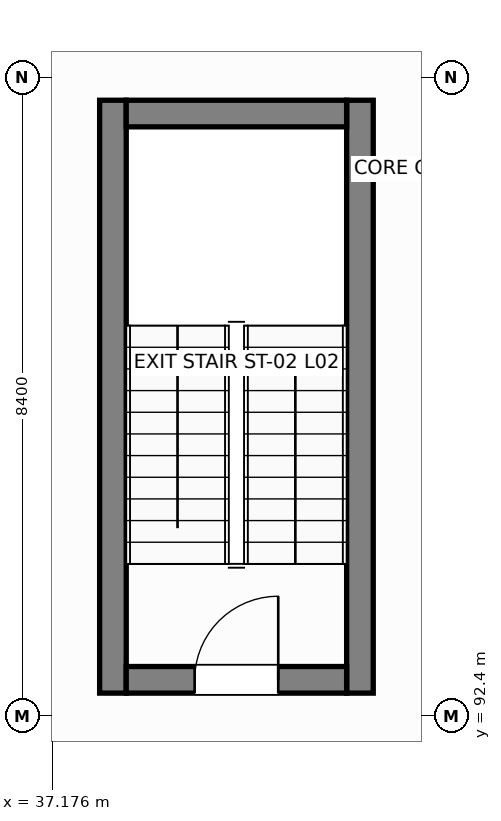
"""IFC4 building model, lengths in metres.
Left out: names, types, materials, properties, quantities, classifications, styles, units other than length and angle.
Written with IfcOpenShell. Run it as: python <this file> out.ifc"""

import sys

from ifc_helpers import new_model, si_unit, direction, frame, frame_2d, origin, place, context, subcontext, project, spatial, rectangle, extrude, element, fill, save


model = new_model("IFC4")
c1 = context("Model", 3, precision=1e-05, world=origin(), true_north=direction((0.0, 1.0)))
c2 = subcontext(c1, "Body", "Model", "MODEL_VIEW")
j1 = project(units=[si_unit("LENGTHUNIT", "METRE"), si_unit("PLANEANGLEUNIT", "RADIAN")], contexts=[c1])
p1 = place(None, origin())
s1 = spatial("IfcSite", under=j1, at=p1, CompositionType="ELEMENT")
p2 = place(p1, origin())
s2 = spatial("IfcBuilding", under=s1, at=p2, CompositionType="ELEMENT")
p3 = place(p2, frame((0.0, 0.0, 9.0)))
s3 = spatial("IfcBuildingStorey", under=s2, at=p3, CompositionType="ELEMENT", Elevation=9.0)
for number, where, z_axis, x_axis in (
    (1, (37.975, 92.7, 0.0), (0.0, 0.0, 1.0), (0.0, 1.0, 0.0)),
    (2, (41.225, 92.7, 0.0), (0.0, 0.0, 1.0), (0.0, 1.0, 0.0)),
):
    element("IfcWall", number, at=place(p3, frame(where, z_axis=z_axis, x_axis=x_axis)), inside=s3, PredefinedType="SHEAR", context=c2, shape_type="SweptSolid", body=[
        extrude(rectangle(XDim=7.8, YDim=0.35, at=frame_2d((3.9, 0.0))), origin(), (0.0, 0.0, 1.0), 3.99),
    ])
p4 = place(p3, frame((38.15, 100.325, 0.0), z_axis=(0.0, 0.0, 1.0), x_axis=(1.0, 0.0, 0.0)))
e3 = element("IfcWall", 3, at=p4, inside=s3, PredefinedType="SHEAR", context=c2, shape_type="SweptSolid", body=[
    extrude(rectangle(XDim=2.9, YDim=0.35, at=frame_2d((1.45, 0.0))), origin(), (0.0, 0.0, 1.0), 3.99),
])
p5 = place(p3, frame((38.15, 92.875, 0.0), z_axis=(0.0, 0.0, 1.0), x_axis=(1.0, 0.0, 0.0)))
e4 = element("IfcWall", 4, at=p5, inside=s3, PredefinedType="SHEAR", context=c2, shape_type="SweptSolid", body=[
    extrude(rectangle(XDim=2.9, YDim=0.35, at=frame_2d((1.45, 0.0))), origin(), (0.0, 0.0, 1.0), 3.99),
])
p6 = place(p5, frame((0.9, 0.0, 0.0)))
e5 = element("IfcOpeningElement", 5, at=p6, cuts=e4, PredefinedType="OPENING", context=c2, shape_type="SweptSolid", body=[
    extrude(rectangle(XDim=1.1, YDim=2.15, at=frame_2d((0.55, 1.075))), frame((0.0, 0.185, 0.0), z_axis=(0.0, -1.0, 0.0), x_axis=(1.0, 0.0, 0.0)), (0.0, 0.0, 1.0), 0.37),
])
p7 = place(p6, origin())
e6 = element("IfcDoor", 6, at=p7, inside=s3, OperationType="SINGLE_SWING_RIGHT", PredefinedType="DOOR", context=c2, shape_type="SweptSolid", body=[
    extrude(rectangle(XDim=1.1, YDim=2.15, at=frame_2d((0.55, 1.075))), frame((0.0, 0.025, 0.0), z_axis=(0.0, -1.0, 0.0), x_axis=(1.0, 0.0, 0.0)), (0.0, 0.0, 1.0), 0.05),
])
fill(e5, e6)
save(model, sys.argv[1])
